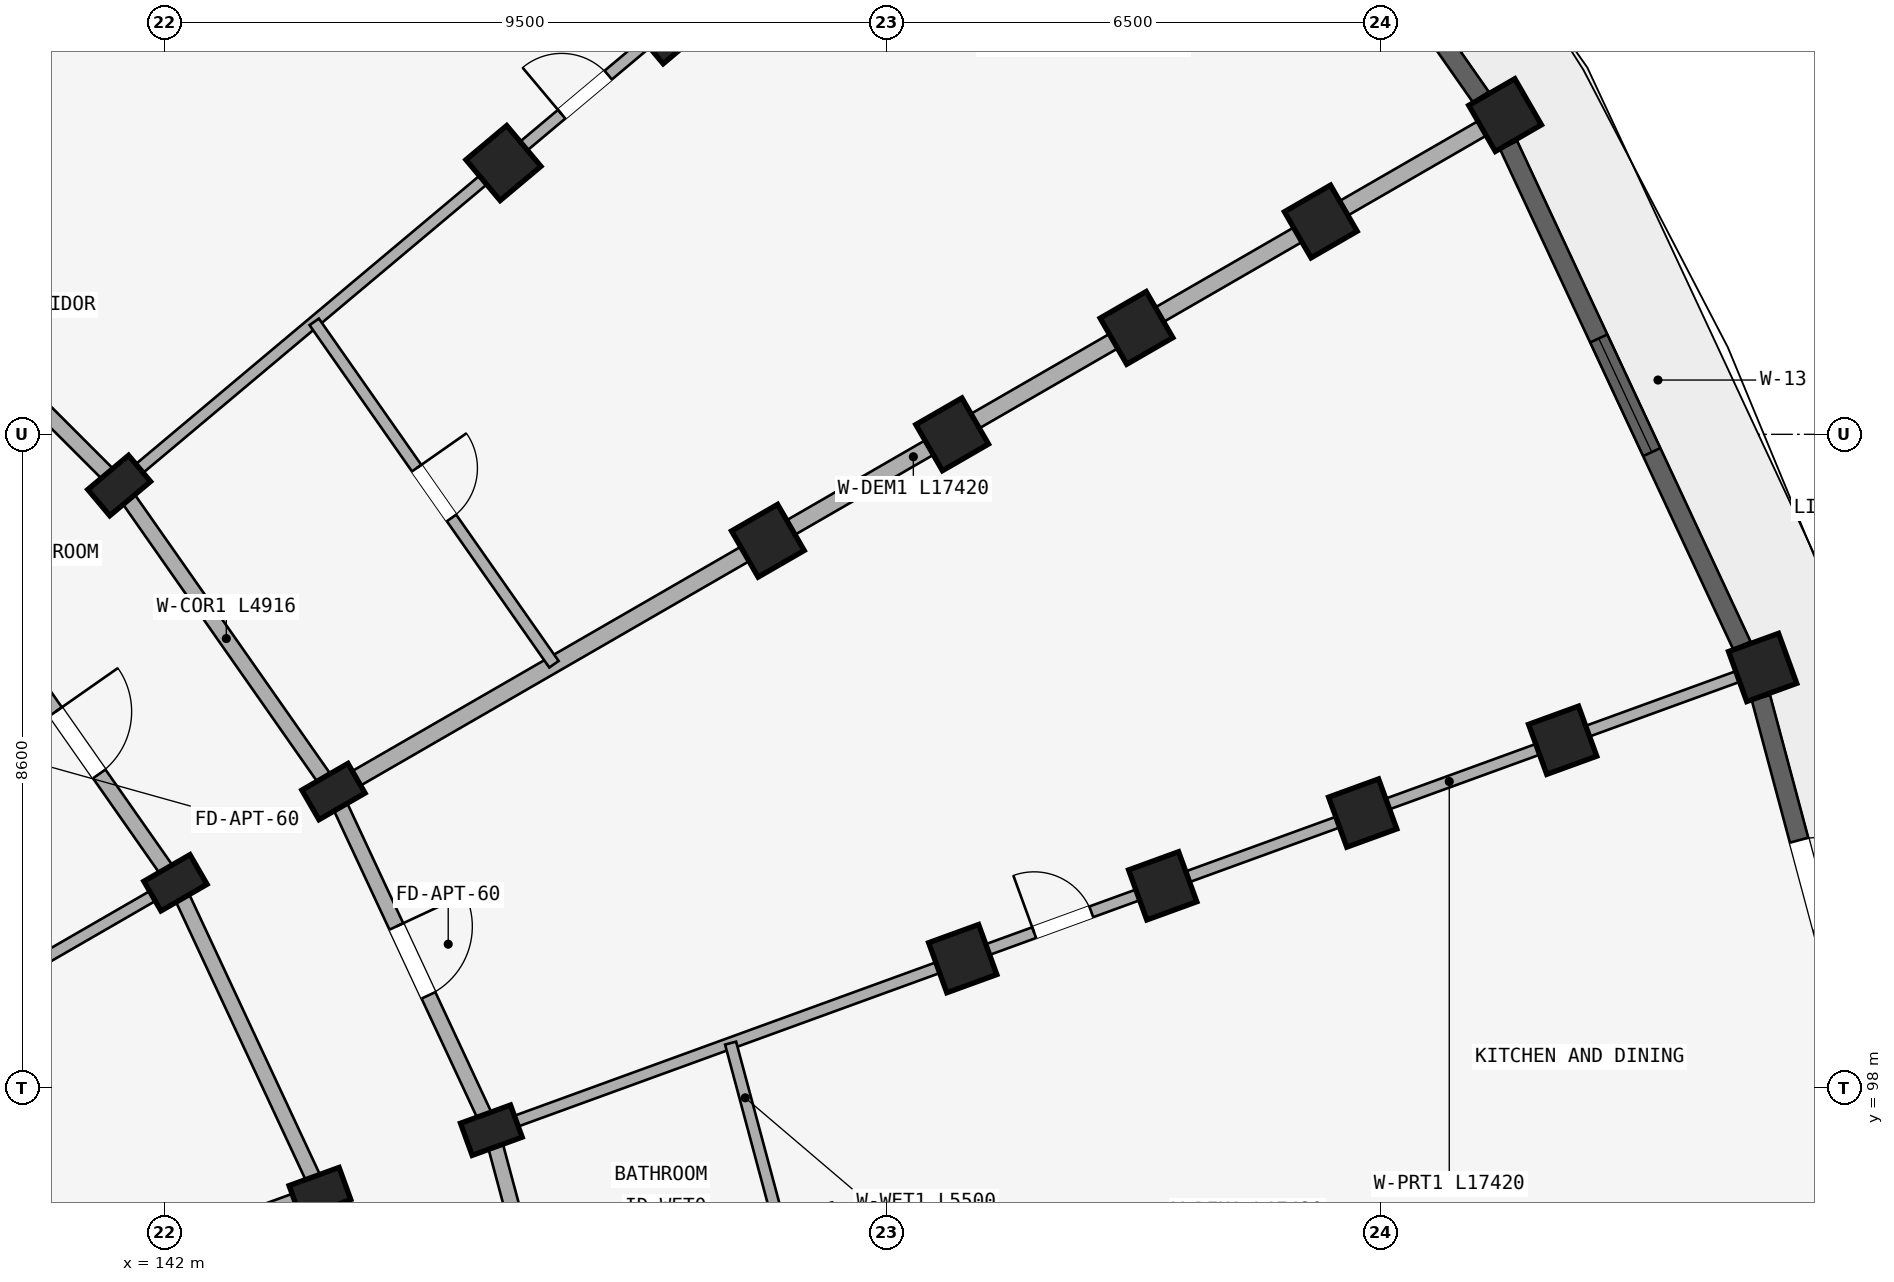
"""IFC4 building model, lengths in metres.
Left out: names, types, materials, properties, quantities, classifications, styles, units other than length and angle.
Written with IfcOpenShell. Run it as: python <this file> out.ifc"""

import sys

from ifc_helpers import new_model, si_unit, direction, frame, frame_2d, origin, origin_2d, place, context, subcontext, project, spatial, rectangle, extrude, element, fill, save


model = new_model("IFC4")
c1 = context("Model", 3, precision=1e-05, world=origin(), true_north=direction((0.0, 1.0)))
c2 = subcontext(c1, "Body", "Model", "MODEL_VIEW")
j1 = project(units=[si_unit("LENGTHUNIT", "METRE"), si_unit("PLANEANGLEUNIT", "RADIAN")], contexts=[c1])
p1 = place(None, origin())
s1 = spatial("IfcSite", under=j1, at=p1, CompositionType="ELEMENT")
p2 = place(p1, origin())
s2 = spatial("IfcBuilding", under=s1, at=p2, CompositionType="ELEMENT")
p3 = place(p2, frame((0.0, 0.0, 24.45)))
s3 = spatial("IfcBuildingStorey", under=s2, at=p3, CompositionType="ELEMENT", Elevation=24.45)
p4 = place(p3, frame((141.402, 105.927, 0.0), z_axis=(0.0, 0.0, 1.0), x_axis=(-0.642787609687, 0.766044443119, 0.0)))
e1 = element("IfcColumn", 1, at=p4, inside=s3, PredefinedType="COLUMN", context=c2, shape_type="SweptSolid", body=[
    extrude(rectangle(XDim=0.45, YDim=0.7, at=origin_2d()), origin(), (0.0, 0.0, 1.0), 2.93),
])
for number, where, z_axis, x_axis in (
    (2, (146.458, 110.169, 0.0), (0.0, 0.0, 1.0), (-0.643, 0.766, 0.0)),
    (3, (148.603, 111.969, 0.0), (0.0, 0.0, 1.0), (-0.643, 0.766, 0.0)),
):
    element("IfcColumn", number, at=place(p3, frame(where, z_axis=z_axis, x_axis=x_axis)), inside=s3, PredefinedType="COLUMN", context=c2, shape_type="SweptSolid", body=[
        extrude(rectangle(XDim=0.7, YDim=0.7, at=origin_2d()), origin(), (0.0, 0.0, 1.0), 2.93),
    ])
for number, where, z_axis, x_axis in (
    (4, (142.144, 100.7, 0.0), (0.0, 0.0, 1.0), (-0.5, 0.866, 0.0)),
    (5, (144.222, 101.9, 0.0), (0.0, 0.0, 1.0), (-0.5, 0.866, 0.0)),
):
    element("IfcColumn", number, at=place(p3, frame(where, z_axis=z_axis, x_axis=x_axis)), inside=s3, PredefinedType="COLUMN", context=c2, shape_type="SweptSolid", body=[
        extrude(rectangle(XDim=0.45, YDim=0.7, at=origin_2d()), origin(), (0.0, 0.0, 1.0), 2.93),
    ])
for number, where, z_axis, x_axis in (
    (6, (149.938, 105.2, 0.0), (0.0, 0.0, 1.0), (-0.5, 0.866, 0.0)),
    (7, (152.363, 106.6, 0.0), (0.0, 0.0, 1.0), (-0.5, 0.866, 0.0)),
    (8, (154.787, 108.0, 0.0), (0.0, 0.0, 1.0), (-0.5, 0.866, 0.0)),
    (9, (157.212, 109.4, 0.0), (0.0, 0.0, 1.0), (-0.5, 0.866, 0.0)),
    (10, (159.637, 110.8, 0.0), (0.0, 0.0, 1.0), (-0.5, 0.866, 0.0)),
):
    element("IfcColumn", number, at=place(p3, frame(where, z_axis=z_axis, x_axis=x_axis)), inside=s3, PredefinedType="COLUMN", context=c2, shape_type="SweptSolid", body=[
        extrude(rectangle(XDim=0.7, YDim=0.7, at=origin_2d()), origin(), (0.0, 0.0, 1.0), 2.93),
    ])
for number, where, z_axis, x_axis in (
    (11, (144.044, 96.624, 0.0), (0.0, 0.0, 1.0), (-0.342, 0.94, 0.0)),
    (12, (146.299, 97.445, 0.0), (0.0, 0.0, 1.0), (-0.342, 0.94, 0.0)),
):
    element("IfcColumn", number, at=place(p3, frame(where, z_axis=z_axis, x_axis=x_axis)), inside=s3, PredefinedType="COLUMN", context=c2, shape_type="SweptSolid", body=[
        extrude(rectangle(XDim=0.45, YDim=0.7, at=origin_2d()), origin(), (0.0, 0.0, 1.0), 2.93),
    ])
for number, where, z_axis, x_axis in (
    (13, (152.501, 99.702, 0.0), (0.0, 0.0, 1.0), (-0.342, 0.94, 0.0)),
    (14, (155.132, 100.66, 0.0), (0.0, 0.0, 1.0), (-0.342, 0.94, 0.0)),
    (15, (157.764, 101.618, 0.0), (0.0, 0.0, 1.0), (-0.342, 0.94, 0.0)),
    (16, (160.395, 102.575, 0.0), (0.0, 0.0, 1.0), (-0.342, 0.94, 0.0)),
    (17, (163.026, 103.533, 0.0), (0.0, 0.0, 1.0), (-0.342, 0.94, 0.0)),
):
    element("IfcColumn", number, at=place(p3, frame(where, z_axis=z_axis, x_axis=x_axis)), inside=s3, PredefinedType="COLUMN", context=c2, shape_type="SweptSolid", body=[
        extrude(rectangle(XDim=0.7, YDim=0.7, at=origin_2d()), origin(), (0.0, 0.0, 1.0), 2.93),
    ])
p5 = place(p3, frame((137.927, 109.402, 0.0), z_axis=(0.0, 0.0, 1.0), x_axis=(0.707106781187, -0.707106781187, 0.0)))
e18 = element("IfcWall", 18, at=p5, inside=s3, PredefinedType="STANDARD", context=c2, shape_type="SweptSolid", body=[
    extrude(rectangle(XDim=4.916, YDim=0.2, at=frame_2d((2.458, 0.0))), origin(), (0.0, 0.0, 1.0), 2.372),
])
p6 = place(p3, frame((139.564, 104.384, 0.0), z_axis=(0.0, 0.0, 1.0), x_axis=(0.573571637217, -0.819155404658, 0.0)))
e19 = element("IfcWall", 19, at=p6, inside=s3, PredefinedType="STANDARD", context=c2, shape_type="SweptSolid", body=[
    extrude(rectangle(XDim=4.497, YDim=0.2, at=frame_2d((2.249, 0.0))), origin(), (0.0, 0.0, 1.0), 2.372),
])
p7 = place(p6, frame((1.749, 0.0, 0.0)))
e20 = element("IfcOpeningElement", 20, at=p7, cuts=e19, PredefinedType="OPENING", context=c2, shape_type="SweptSolid", body=[
    extrude(rectangle(XDim=1.0, YDim=2.15, at=frame_2d((0.5, 1.075))), frame((0.0, 0.11, 0.0), z_axis=(0.0, -1.0, 0.0), x_axis=(1.0, 0.0, 0.0)), (0.0, 0.0, 1.0), 0.22),
])
p8 = place(p3, frame((141.402, 105.927, 0.0), z_axis=(0.0, 0.0, 1.0), x_axis=(0.573592335331, -0.819140911474, 0.0)))
e21 = element("IfcWall", 21, at=p8, inside=s3, PredefinedType="STANDARD", context=c2, shape_type="SweptSolid", body=[
    extrude(rectangle(XDim=4.916, YDim=0.2, at=frame_2d((2.458, 0.0))), origin(), (0.0, 0.0, 1.0), 2.372),
])
p9 = place(p3, frame((142.144, 100.7, 0.0), z_axis=(0.0, 0.0, 1.0), x_axis=(0.422617978463, -0.906307919131, 0.0)))
e22 = element("IfcWall", 22, at=p9, inside=s3, PredefinedType="STANDARD", context=c2, shape_type="SweptSolid", body=[
    extrude(rectangle(XDim=4.497, YDim=0.2, at=frame_2d((2.249, 0.0))), origin(), (0.0, 0.0, 1.0), 2.372),
])
p10 = place(p3, frame((144.222, 101.9, 0.0), z_axis=(0.0, 0.0, 1.0), x_axis=(0.422629854778, -0.906302381024, 0.0)))
e23 = element("IfcWall", 23, at=p10, inside=s3, PredefinedType="STANDARD", context=c2, shape_type="SweptSolid", body=[
    extrude(rectangle(XDim=4.915, YDim=0.2, at=frame_2d((2.458, 0.0))), origin(), (0.0, 0.0, 1.0), 2.372),
])
p11 = place(p10, frame((1.958, 0.0, 0.0)))
e24 = element("IfcOpeningElement", 24, at=p11, cuts=e23, PredefinedType="OPENING", context=c2, shape_type="SweptSolid", body=[
    extrude(rectangle(XDim=1.0, YDim=2.15, at=frame_2d((0.5, 1.075))), frame((0.0, 0.11, 0.0), z_axis=(0.0, -1.0, 0.0), x_axis=(1.0, 0.0, 0.0)), (0.0, 0.0, 1.0), 0.22),
])
p12 = place(p3, frame((144.044, 96.624, 0.0), z_axis=(0.0, 0.0, 1.0), x_axis=(0.258787642463, -0.965934240054, 0.0)))
e25 = element("IfcWall", 25, at=p12, inside=s3, PredefinedType="STANDARD", context=c2, shape_type="SweptSolid", body=[
    extrude(rectangle(XDim=4.497, YDim=0.2, at=frame_2d((2.249, 0.0))), origin(), (0.0, 0.0, 1.0), 2.372),
])
p13 = place(p12, frame((1.729, 0.0, 0.0)))
e26 = element("IfcOpeningElement", 26, at=p13, cuts=e25, PredefinedType="OPENING", context=c2, shape_type="SweptSolid", body=[
    extrude(rectangle(XDim=1.04, YDim=2.15, at=frame_2d((0.52, 1.075))), frame((0.0, 0.11, 0.0), z_axis=(0.0, -1.0, 0.0), x_axis=(1.0, 0.0, 0.0)), (0.0, 0.0, 1.0), 0.22),
])
p14 = place(p3, frame((146.299, 97.445, 0.0), z_axis=(0.0, 0.0, 1.0), x_axis=(0.258803112091, -0.965930095386, 0.0)))
e27 = element("IfcWall", 27, at=p14, inside=s3, PredefinedType="STANDARD", context=c2, shape_type="SweptSolid", body=[
    extrude(rectangle(XDim=4.916, YDim=0.2, at=frame_2d((2.458, 0.0))), origin(), (0.0, 0.0, 1.0), 2.372),
])
p15 = place(p3, frame((137.991, 109.479, 0.0), z_axis=(0.0, 0.0, 1.0), x_axis=(0.642784757967, 0.766046835987, 0.0)))
e28 = element("IfcWall", 28, at=p15, inside=s3, PredefinedType="PARTITIONING", context=c2, shape_type="SweptSolid", body=[
    extrude(rectangle(XDim=17.42, YDim=0.15, at=frame_2d((8.71, 0.0))), origin(), (0.0, 0.0, 1.0), 2.372),
])
p16 = place(p15, frame((7.5, 0.0, 0.0)))
e29 = element("IfcOpeningElement", 29, at=p16, cuts=e28, PredefinedType="OPENING", context=c2, shape_type="SweptSolid", body=[
    extrude(rectangle(XDim=0.8, YDim=2.1, at=frame_2d((0.4, 1.05))), frame((0.0, 0.085, 0.0), z_axis=(0.0, -1.0, 0.0), x_axis=(1.0, 0.0, 0.0)), (0.0, 0.0, 1.0), 0.17),
])
p17 = place(p3, frame((141.479, 105.991, 0.0), z_axis=(0.0, 0.0, 1.0), x_axis=(0.766046835987, 0.642784757967, 0.0)))
e30 = element("IfcWall", 30, at=p17, inside=s3, PredefinedType="PARTITIONING", context=c2, shape_type="SweptSolid", body=[
    extrude(rectangle(XDim=17.42, YDim=0.15, at=frame_2d((8.71, 0.0))), origin(), (0.0, 0.0, 1.0), 2.372),
])
p18 = place(p17, frame((7.5, 0.0, 0.0)))
e31 = element("IfcOpeningElement", 31, at=p18, cuts=e30, PredefinedType="OPENING", context=c2, shape_type="SweptSolid", body=[
    extrude(rectangle(XDim=0.8, YDim=2.1, at=frame_2d((0.4, 1.05))), frame((0.0, 0.085, 0.0), z_axis=(0.0, -1.0, 0.0), x_axis=(1.0, 0.0, 0.0)), (0.0, 0.0, 1.0), 0.17),
])
p19 = place(p3, frame((136.254, 97.3, 0.0), z_axis=(0.0, 0.0, 1.0), x_axis=(0.866026575979, 0.499997969693, 0.0)))
e32 = element("IfcWall", 32, at=p19, inside=s3, PredefinedType="PARTITIONING", context=c2, shape_type="SweptSolid", body=[
    extrude(rectangle(XDim=6.75, YDim=0.15, at=frame_2d((3.375, 0.0))), origin(), (0.0, 0.0, 1.0), 2.372),
])
p20 = place(p19, frame((3.222, 0.0, 0.0)))
e33 = element("IfcOpeningElement", 33, at=p20, cuts=e32, PredefinedType="OPENING", context=c2, shape_type="SweptSolid", body=[
    extrude(rectangle(XDim=0.98, YDim=2.12, at=frame_2d((0.49, 1.06))), frame((0.0, 0.085, 0.0), z_axis=(0.0, -1.0, 0.0), x_axis=(1.0, 0.0, 0.0)), (0.0, 0.0, 1.0), 0.17),
])
p21 = place(p3, frame((144.309, 101.95, 0.0), z_axis=(0.0, 0.0, 1.0), x_axis=(0.866026648973, 0.499997843263, 0.0)))
e34 = element("IfcWall", 34, at=p21, inside=s3, PredefinedType="STANDARD", context=c2, shape_type="SweptSolid", body=[
    extrude(rectangle(XDim=17.42, YDim=0.22, at=frame_2d((8.71, 0.0))), origin(), (0.0, 0.0, 1.0), 2.372),
])
p22 = place(p3, frame((137.654, 94.298, 0.0), z_axis=(0.0, 0.0, 1.0), x_axis=(0.939696231917, 0.342010221662, 0.0)))
e35 = element("IfcWall", 35, at=p22, inside=s3, PredefinedType="STANDARD", context=c2, shape_type="SweptSolid", body=[
    extrude(rectangle(XDim=6.75, YDim=0.22, at=frame_2d((3.375, 0.0))), origin(), (0.0, 0.0, 1.0), 2.372),
])
p23 = place(p3, frame((146.393, 97.479, 0.0), z_axis=(0.0, 0.0, 1.0), x_axis=(0.939691901159, 0.342022120477, 0.0)))
e36 = element("IfcWall", 36, at=p23, inside=s3, PredefinedType="PARTITIONING", context=c2, shape_type="SweptSolid", body=[
    extrude(rectangle(XDim=17.42, YDim=0.15, at=frame_2d((8.71, 0.0))), origin(), (0.0, 0.0, 1.0), 2.372),
])
p24 = place(p23, frame((7.5, 0.0, 0.0)))
e37 = element("IfcOpeningElement", 37, at=p24, cuts=e36, PredefinedType="OPENING", context=c2, shape_type="SweptSolid", body=[
    extrude(rectangle(XDim=0.8, YDim=2.1, at=frame_2d((0.4, 1.05))), frame((0.0, 0.085, 0.0), z_axis=(0.0, -1.0, 0.0), x_axis=(1.0, 0.0, 0.0)), (0.0, 0.0, 1.0), 0.17),
])
p25 = place(p3, frame((143.969, 108.08, 0.0), z_axis=(0.0, 0.0, 1.0), x_axis=(0.573569599955, -0.819156831143, 0.0)))
e38 = element("IfcWall", 38, at=p25, inside=s3, PredefinedType="PLUMBINGWALL", context=c2, shape_type="SweptSolid", body=[
    extrude(rectangle(XDim=5.5, YDim=0.15, at=frame_2d((2.75, 0.0))), origin(), (0.0, 0.0, 1.0), 2.372),
])
p26 = place(p25, frame((2.35, 0.0, 0.0)))
e39 = element("IfcOpeningElement", 39, at=p26, cuts=e38, PredefinedType="OPENING", context=c2, shape_type="SweptSolid", body=[
    extrude(rectangle(XDim=0.8, YDim=2.1, at=frame_2d((0.4, 1.05))), frame((0.0, 0.085, 0.0), z_axis=(0.0, -1.0, 0.0), x_axis=(1.0, 0.0, 0.0)), (0.0, 0.0, 1.0), 0.17),
])
p27 = place(p3, frame((149.447, 98.591, 0.0), z_axis=(0.0, 0.0, 1.0), x_axis=(0.258806351229, -0.965929227513, 0.0)))
e40 = element("IfcWall", 40, at=p27, inside=s3, PredefinedType="PLUMBINGWALL", context=c2, shape_type="SweptSolid", body=[
    extrude(rectangle(XDim=5.5, YDim=0.15, at=frame_2d((2.75, 0.0))), origin(), (0.0, 0.0, 1.0), 2.372),
])
p28 = place(p27, frame((2.37, 0.0, 0.0)))
e41 = element("IfcOpeningElement", 41, at=p28, cuts=e40, PredefinedType="OPENING", context=c2, shape_type="SweptSolid", body=[
    extrude(rectangle(XDim=0.76, YDim=2.05, at=frame_2d((0.38, 1.025))), frame((0.0, 0.085, 0.0), z_axis=(0.0, -1.0, 0.0), x_axis=(1.0, 0.0, 0.0)), (0.0, 0.0, 1.0), 0.17),
])
p29 = place(p3, frame((155.151, 116.989, 0.0), z_axis=(0.0, 0.0, 1.0), x_axis=(0.573566061701, -0.819159308599, 0.0)))
e42 = element("IfcWall", 42, at=p29, inside=s3, PredefinedType="STANDARD", context=c2, shape_type="SweptSolid", body=[
    extrude(rectangle(XDim=7.267, YDim=0.25, at=frame_2d((3.633, 0.0))), origin(), (0.0, 0.0, 1.0), 2.372),
])
p30 = place(p29, frame((2.733, 0.0, 0.522)))
e43 = element("IfcOpeningElement", 43, at=p30, cuts=e42, PredefinedType="OPENING", context=c2, shape_type="SweptSolid", body=[
    extrude(rectangle(XDim=1.8, YDim=1.65, at=frame_2d((0.9, 0.825))), frame((0.0, 0.135, 0.0), z_axis=(0.0, -1.0, 0.0), x_axis=(1.0, 0.0, 0.0)), (0.0, 0.0, 1.0), 0.27),
])
p31 = place(p3, frame((159.683, 110.406, 0.0), z_axis=(0.0, 0.0, 1.0), x_axis=(0.422627946127, -0.90630327107, 0.0)))
e44 = element("IfcWall", 44, at=p31, inside=s3, PredefinedType="STANDARD", context=c2, shape_type="SweptSolid", body=[
    extrude(rectangle(XDim=7.267, YDim=0.25, at=frame_2d((3.633, 0.0))), origin(), (0.0, 0.0, 1.0), 2.372),
])
p32 = place(p31, frame((2.808, 0.0, 0.422)))
e45 = element("IfcOpeningElement", 45, at=p32, cuts=e44, PredefinedType="OPENING", context=c2, shape_type="SweptSolid", body=[
    extrude(rectangle(XDim=1.65, YDim=1.75, at=frame_2d((0.825, 0.875))), frame((0.0, 0.135, 0.0), z_axis=(0.0, -1.0, 0.0), x_axis=(1.0, 0.0, 0.0)), (0.0, 0.0, 1.0), 0.27),
])
p33 = place(p3, frame((163.002, 103.137, 0.0), z_axis=(0.0, 0.0, 1.0), x_axis=(0.258802140196, -0.965930355787, 0.0)))
e46 = element("IfcWall", 46, at=p33, inside=s3, PredefinedType="STANDARD", context=c2, shape_type="SweptSolid", body=[
    extrude(rectangle(XDim=7.267, YDim=0.25, at=frame_2d((3.633, 0.0))), origin(), (0.0, 0.0, 1.0), 2.372),
])
p34 = place(p33, frame((4.766, 0.0, 0.522)))
e47 = element("IfcOpeningElement", 47, at=p34, cuts=e46, PredefinedType="OPENING", context=c2, shape_type="SweptSolid", body=[
    extrude(rectangle(XDim=1.2, YDim=1.5, at=frame_2d((0.6, 0.75))), frame((0.0, 0.135, 0.0), z_axis=(0.0, -1.0, 0.0), x_axis=(1.0, 0.0, 0.0)), (0.0, 0.0, 1.0), 0.27),
])
p35 = place(p33, frame((1.943, 0.0, 0.0)))
e48 = element("IfcOpeningElement", 48, at=p35, cuts=e46, PredefinedType="OPENING", context=c2, shape_type="SweptSolid", body=[
    extrude(rectangle(XDim=1.2, YDim=2.15, at=frame_2d((0.6, 1.075))), frame((0.0, 0.135, 0.0), z_axis=(0.0, -1.0, 0.0), x_axis=(1.0, 0.0, 0.0)), (0.0, 0.0, 1.0), 0.27),
])
p36 = place(p32, origin())
e49 = element("IfcWindow", 49, at=p36, inside=s3, PartitioningType="DOUBLE_PANEL_VERTICAL", PredefinedType="WINDOW", context=c2, shape_type="SweptSolid", body=[
    extrude(rectangle(XDim=1.65, YDim=1.75, at=frame_2d((0.825, 0.875))), frame((0.0, 0.03, 0.0), z_axis=(0.0, -1.0, 0.0), x_axis=(1.0, 0.0, 0.0)), (0.0, 0.0, 1.0), 0.06),
])
fill(e45, e49)
p37 = place(p18, origin())
e50 = element("IfcDoor", 50, at=p37, inside=s3, OperationType="SINGLE_SWING_LEFT", PredefinedType="DOOR", context=c2, shape_type="SweptSolid", body=[
    extrude(rectangle(XDim=0.8, YDim=2.1, at=frame_2d((0.4, 1.05))), frame((0.0, 0.025, 0.0), z_axis=(0.0, -1.0, 0.0), x_axis=(1.0, 0.0, 0.0)), (0.0, 0.0, 1.0), 0.05),
])
fill(e31, e50)
p38 = place(p24, origin())
e51 = element("IfcDoor", 51, at=p38, inside=s3, OperationType="SINGLE_SWING_LEFT", PredefinedType="DOOR", context=c2, shape_type="SweptSolid", body=[
    extrude(rectangle(XDim=0.8, YDim=2.1, at=frame_2d((0.4, 1.05))), frame((0.0, 0.025, 0.0), z_axis=(0.0, -1.0, 0.0), x_axis=(1.0, 0.0, 0.0)), (0.0, 0.0, 1.0), 0.05),
])
fill(e37, e51)
p39 = place(p26, origin())
e52 = element("IfcDoor", 52, at=p39, inside=s3, OperationType="SINGLE_SWING_LEFT", PredefinedType="DOOR", context=c2, shape_type="SweptSolid", body=[
    extrude(rectangle(XDim=0.8, YDim=2.1, at=frame_2d((0.4, 1.05))), frame((0.0, 0.025, 0.0), z_axis=(0.0, -1.0, 0.0), x_axis=(1.0, 0.0, 0.0)), (0.0, 0.0, 1.0), 0.05),
])
fill(e39, e52)
p40 = place(p11, frame((1.0, 0.0, 0.0), z_axis=(0.0, 0.0, 1.0), x_axis=(-1.0, 0.0, 0.0)))
e53 = element("IfcDoor", 53, at=p40, inside=s3, OperationType="SINGLE_SWING_RIGHT", PredefinedType="DOOR", context=c2, shape_type="SweptSolid", body=[
    extrude(rectangle(XDim=1.0, YDim=2.15, at=frame_2d((0.5, 1.075))), frame((0.0, 0.025, 0.0), z_axis=(0.0, -1.0, 0.0), x_axis=(1.0, 0.0, 0.0)), (0.0, 0.0, 1.0), 0.05),
])
fill(e24, e53)
p41 = place(p7, origin())
e54 = element("IfcDoor", 54, at=p41, inside=s3, OperationType="SINGLE_SWING_LEFT", PredefinedType="DOOR", context=c2, shape_type="SweptSolid", body=[
    extrude(rectangle(XDim=1.0, YDim=2.15, at=frame_2d((0.5, 1.075))), frame((0.0, 0.025, 0.0), z_axis=(0.0, -1.0, 0.0), x_axis=(1.0, 0.0, 0.0)), (0.0, 0.0, 1.0), 0.05),
])
fill(e20, e54)
p42 = place(p35, origin())
e55 = element("IfcDoor", 55, at=p42, inside=s3, OperationType="SINGLE_SWING_RIGHT", PredefinedType="DOOR", context=c2, shape_type="SweptSolid", body=[
    extrude(rectangle(XDim=1.2, YDim=2.15, at=frame_2d((0.6, 1.075))), frame((0.0, 0.025, 0.0), z_axis=(0.0, -1.0, 0.0), x_axis=(1.0, 0.0, 0.0)), (0.0, 0.0, 1.0), 0.05),
])
fill(e48, e55)
save(model, sys.argv[1])
